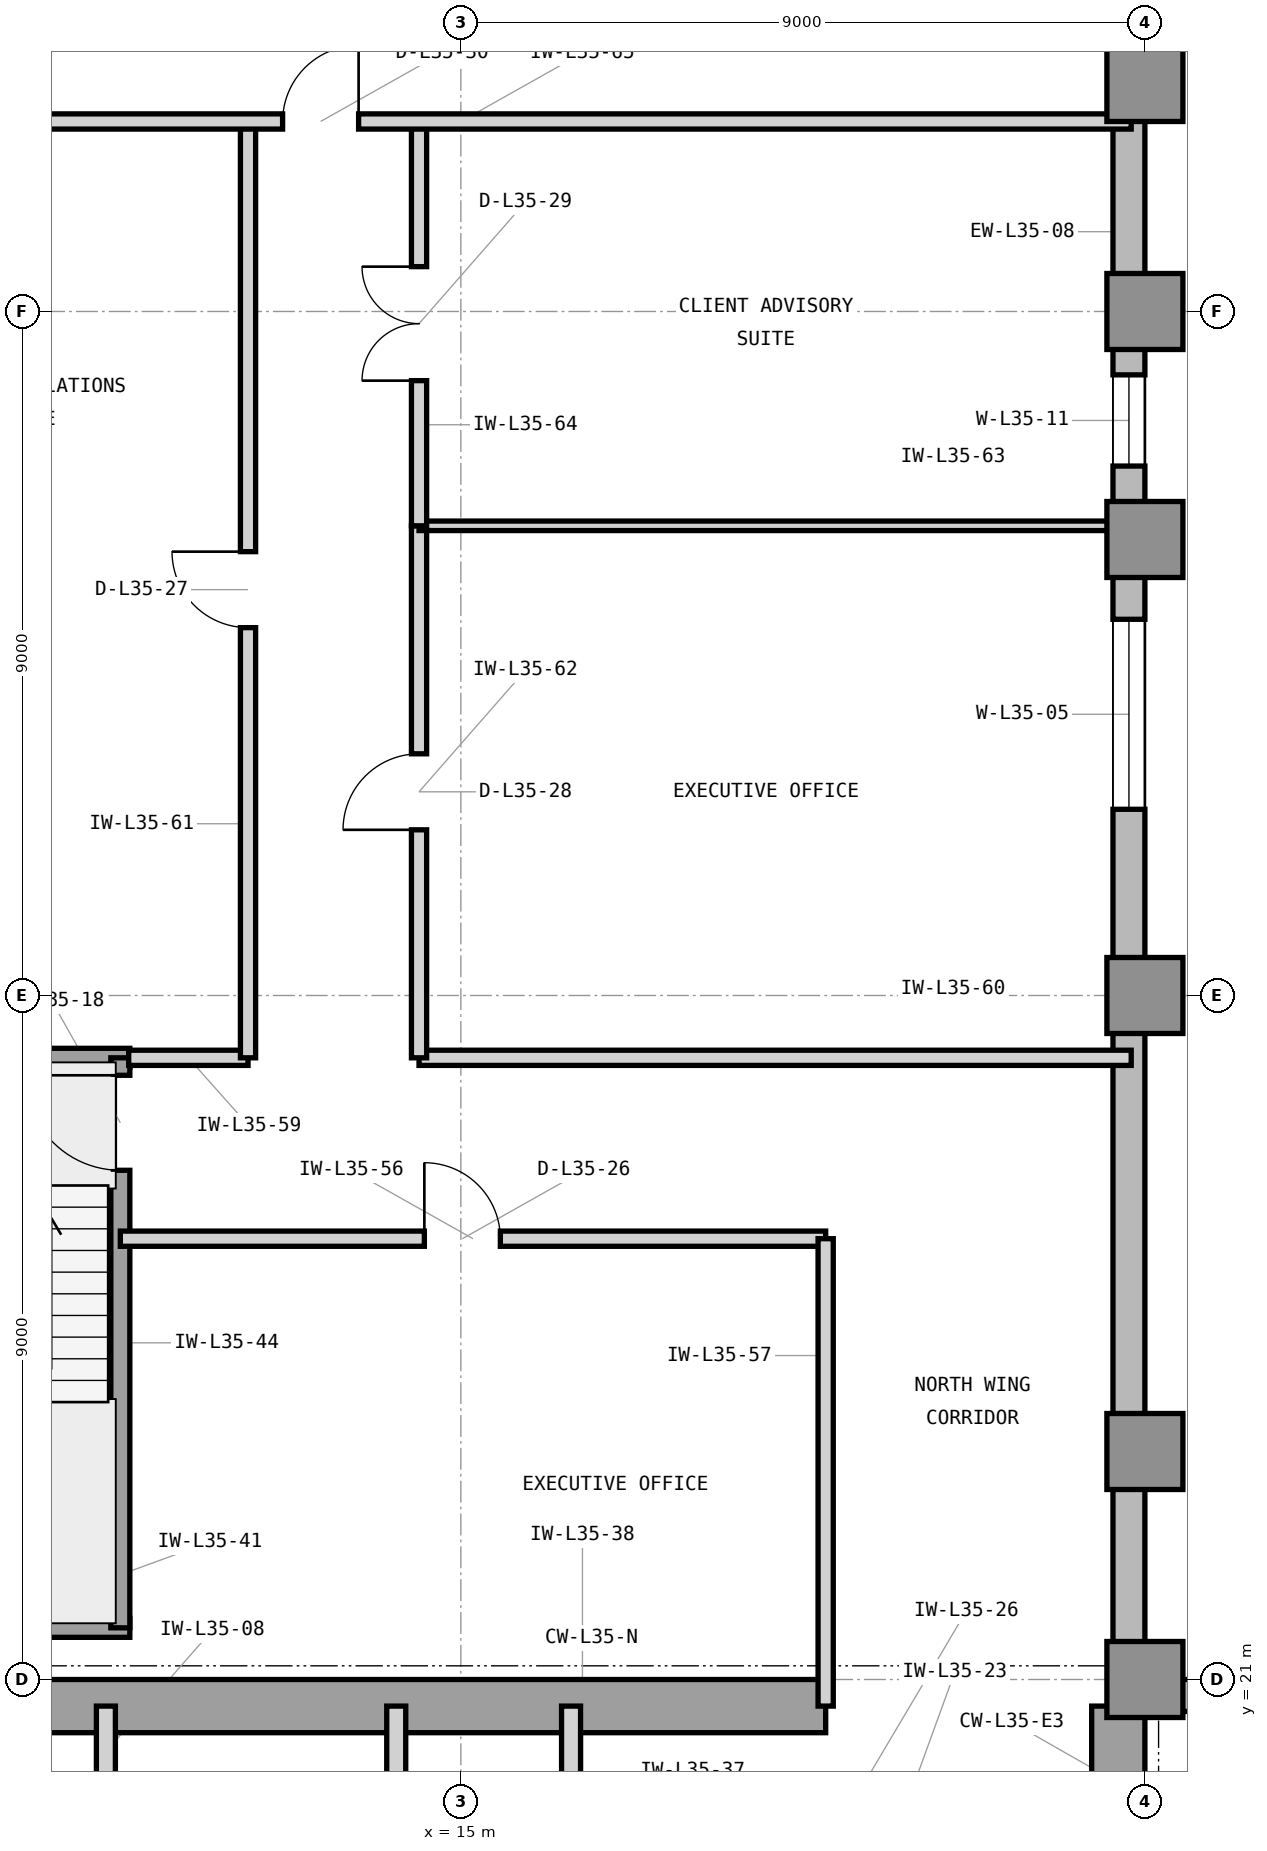
"""IFC4 building model, lengths in metres.
Left out: names, types, materials, properties, quantities, classifications, styles, units other than length and angle.
Written with IfcOpenShell. Run it as: python <this file> out.ifc"""

import sys

from ifc_helpers import new_model, si_unit, direction, frame, frame_2d, origin, origin_2d, place, context, subcontext, project, spatial, rectangle, extrude, element, fill, save


model = new_model("IFC4")
c1 = context("Model", 3, precision=1e-05, world=origin(), true_north=direction((0.0, 1.0)))
c2 = subcontext(c1, "Body", "Model", "MODEL_VIEW")
j1 = project(units=[si_unit("LENGTHUNIT", "METRE"), si_unit("PLANEANGLEUNIT", "RADIAN")], contexts=[c1])
p1 = place(None, origin())
s1 = spatial("IfcSite", under=j1, at=p1, CompositionType="ELEMENT")
p2 = place(p1, origin())
s2 = spatial("IfcBuilding", under=s1, at=p2, CompositionType="ELEMENT")
p3 = place(p2, frame((0.0, 0.0, 147.9)))
s3 = spatial("IfcBuildingStorey", under=s2, at=p3, CompositionType="ELEMENT", Elevation=147.9)
p4 = place(p3, frame((7.475, 20.65, 0.0), z_axis=(0.0, 0.0, 1.0), x_axis=(1.0, 0.0, 0.0)))
e1 = element("IfcWall", 1, at=p4, inside=s3, PredefinedType="SHEAR", context=c2, shape_type="SweptSolid", body=[
    extrude(rectangle(XDim=12.325, YDim=0.7, at=frame_2d((6.163, 0.0))), origin(), (0.0, 0.0, 1.0), 3.9),
])
p5 = place(p3, frame((23.65, 16.6, 0.0), z_axis=(0.0, 0.0, 1.0), x_axis=(0.0, 1.0, 0.0)))
e2 = element("IfcWall", 2, at=p5, inside=s3, PredefinedType="SHEAR", context=c2, shape_type="SweptSolid", body=[
    extrude(rectangle(XDim=4.05, YDim=0.7, at=frame_2d((2.025, 0.0))), origin(), (0.0, 0.0, 1.0), 3.9),
])
for number, where, z_axis, x_axis in (
    (3, (24.0, 21.0, 0.0), (0.0, 0.0, 1.0), (1.0, 0.0, 0.0)),
    (4, (24.0, 24.0, 0.0), (0.0, 0.0, 1.0), (1.0, 0.0, 0.0)),
    (5, (24.0, 30.0, 0.0), (0.0, 0.0, 1.0), (1.0, 0.0, 0.0)),
    (6, (24.0, 36.0, 0.0), (0.0, 0.0, 1.0), (1.0, 0.0, 0.0)),
    (7, (24.0, 39.0, 0.0), (0.0, 0.0, 1.0), (1.0, 0.0, 0.0)),
    (8, (24.0, 42.0, 0.0), (0.0, 0.0, 1.0), (1.0, 0.0, 0.0)),
):
    element("IfcColumn", number, at=place(p3, frame(where, z_axis=z_axis, x_axis=x_axis)), inside=s3, PredefinedType="COLUMN", context=c2, shape_type="SweptSolid", body=[
        extrude(rectangle(XDim=1.0, YDim=1.0, at=origin_2d()), origin(), (0.0, 0.0, 1.0), 3.9),
    ])
p6 = place(p3, frame((58.4, 20.79, 0.0), z_axis=(0.0, 0.0, 1.0), x_axis=(-1.0, 0.0, 0.0)))
e9 = element("IfcWall", 9, at=p6, inside=s3, PredefinedType="STANDARD", context=c2, shape_type="SweptSolid", body=[
    extrude(rectangle(XDim=34.4, YDim=0.42, at=frame_2d((17.2, 0.0))), origin(), (0.0, 0.0, 1.0), 3.7),
])
p7 = place(p6, frame((20.864, 0.0, 0.85)))
e10 = element("IfcOpeningElement", 10, at=p7, cuts=e9, PredefinedType="OPENING", context=c2, shape_type="SweptSolid", body=[
    extrude(rectangle(XDim=2.5, YDim=2.25, at=frame_2d((1.25, 1.125))), frame((0.0, 0.22, 0.0), z_axis=(0.0, -1.0, 0.0), x_axis=(1.0, 0.0, 0.0)), (0.0, 0.0, 1.0), 0.44),
])
p8 = place(p6, frame((32.222, 0.0, 0.85)))
e11 = element("IfcOpeningElement", 11, at=p8, cuts=e9, PredefinedType="OPENING", context=c2, shape_type="SweptSolid", body=[
    extrude(rectangle(XDim=1.2, YDim=2.25, at=frame_2d((0.6, 1.125))), frame((0.0, 0.22, 0.0), z_axis=(0.0, -1.0, 0.0), x_axis=(1.0, 0.0, 0.0)), (0.0, 0.0, 1.0), 0.44),
])
p9 = place(p6, frame((11.386, 0.0, 0.85)))
e12 = element("IfcOpeningElement", 12, at=p9, cuts=e9, PredefinedType="OPENING", context=c2, shape_type="SweptSolid", body=[
    extrude(rectangle(XDim=2.5, YDim=2.25, at=frame_2d((1.25, 1.125))), frame((0.0, 0.22, 0.0), z_axis=(0.0, -1.0, 0.0), x_axis=(1.0, 0.0, 0.0)), (0.0, 0.0, 1.0), 0.44),
])
p10 = place(p3, frame((23.79, 21.0, 0.0), z_axis=(0.0, 0.0, 1.0), x_axis=(0.0, 1.0, 0.0)))
e13 = element("IfcWall", 13, at=p10, inside=s3, PredefinedType="STANDARD", context=c2, shape_type="SweptSolid", body=[
    extrude(rectangle(XDim=25.4, YDim=0.42, at=frame_2d((12.7, 0.0))), origin(), (0.0, 0.0, 1.0), 3.7),
])
p11 = place(p10, frame((11.45, 0.0, 0.85)))
e14 = element("IfcOpeningElement", 14, at=p11, cuts=e13, PredefinedType="OPENING", context=c2, shape_type="SweptSolid", body=[
    extrude(rectangle(XDim=2.5, YDim=2.25, at=frame_2d((1.25, 1.125))), frame((0.0, 0.22, 0.0), z_axis=(0.0, -1.0, 0.0), x_axis=(1.0, 0.0, 0.0)), (0.0, 0.0, 1.0), 0.44),
])
p12 = place(p10, frame((15.966, 0.0, 0.85)))
e15 = element("IfcOpeningElement", 15, at=p12, cuts=e13, PredefinedType="OPENING", context=c2, shape_type="SweptSolid", body=[
    extrude(rectangle(XDim=1.2, YDim=2.25, at=frame_2d((0.6, 1.125))), frame((0.0, 0.22, 0.0), z_axis=(0.0, -1.0, 0.0), x_axis=(1.0, 0.0, 0.0)), (0.0, 0.0, 1.0), 0.44),
])
p13 = place(p3, frame((10.33, 19.45, 0.0), z_axis=(0.0, 0.0, 1.0), x_axis=(0.0, 1.0, 0.0)))
e16 = element("IfcWall", 16, at=p13, inside=s3, PredefinedType="PARTITIONING", context=c2, shape_type="SweptSolid", body=[
    extrude(rectangle(XDim=1.2, YDim=0.25, at=frame_2d((0.6, 0.0))), origin(), (0.0, 0.0, 1.0), 2.994),
])
for number, where, z_axis, x_axis in (
    (17, (14.15, 16.7, 0.0), (0.0, 0.0, 1.0), (0.0, 1.0, 0.0)),
    (18, (16.45, 16.7, 0.0), (0.0, 0.0, 1.0), (0.0, 1.0, 0.0)),
):
    element("IfcWall", number, at=place(p3, frame(where, z_axis=z_axis, x_axis=x_axis)), inside=s3, PredefinedType="PARTITIONING", context=c2, shape_type="SweptSolid", body=[
        extrude(rectangle(XDim=3.95, YDim=0.25, at=frame_2d((1.975, 0.0))), origin(), (0.0, 0.0, 1.0), 3.69),
    ])
for number, where, z_axis, x_axis in (
    (19, (6.555, 21.68, 0.0), (0.0, 0.0, 1.0), (1.0, 0.0, 0.0)),
    (20, (6.555, 29.18, 0.0), (0.0, 0.0, 1.0), (1.0, 0.0, 0.0)),
):
    element("IfcWall", number, at=place(p3, frame(where, z_axis=z_axis, x_axis=x_axis)), inside=s3, PredefinedType="SHEAR", context=c2, shape_type="SweptSolid", body=[
        extrude(rectangle(XDim=4.09, YDim=0.25, at=frame_2d((2.045, 0.0))), origin(), (0.0, 0.0, 1.0), 3.9),
    ])
p14 = place(p3, frame((10.52, 21.68, 0.0), z_axis=(0.0, 0.0, 1.0), x_axis=(0.0, 1.0, 0.0)))
e21 = element("IfcWall", 21, at=p14, inside=s3, PredefinedType="SHEAR", context=c2, shape_type="SweptSolid", body=[
    extrude(rectangle(XDim=7.5, YDim=0.25, at=frame_2d((3.75, 0.0))), origin(), (0.0, 0.0, 1.0), 3.9),
])
p15 = place(p14, frame((6.02, 0.0, 0.0)))
e22 = element("IfcOpeningElement", 22, at=p15, cuts=e21, PredefinedType="OPENING", context=c2, shape_type="SweptSolid", body=[
    extrude(rectangle(XDim=1.25, YDim=2.2, at=frame_2d((0.625, 1.1))), frame((0.0, 0.135, 0.0), z_axis=(0.0, -1.0, 0.0), x_axis=(1.0, 0.0, 0.0)), (0.0, 0.0, 1.0), 0.27),
])
p16 = place(p3, frame((10.52, 26.8, 0.0), z_axis=(0.0, 0.0, 1.0), x_axis=(1.0, 0.0, 0.0)))
e23 = element("IfcWall", 23, at=p16, inside=s3, PredefinedType="PARTITIONING", context=c2, shape_type="SweptSolid", body=[
    extrude(rectangle(XDim=9.28, YDim=0.2, at=frame_2d((4.64, 0.0))), origin(), (0.0, 0.0, 1.0), 3.69),
])
p17 = place(p16, frame((4.0, 0.0, 0.0)))
e24 = element("IfcOpeningElement", 24, at=p17, cuts=e23, PredefinedType="OPENING", context=c2, shape_type="SweptSolid", body=[
    extrude(rectangle(XDim=1.0, YDim=2.15, at=frame_2d((0.5, 1.075))), frame((0.0, 0.11, 0.0), z_axis=(0.0, -1.0, 0.0), x_axis=(1.0, 0.0, 0.0)), (0.0, 0.0, 1.0), 0.22),
])
p18 = place(p3, frame((19.8, 20.65, 0.0), z_axis=(0.0, 0.0, 1.0), x_axis=(0.0, 1.0, 0.0)))
e25 = element("IfcWall", 25, at=p18, inside=s3, PredefinedType="PARTITIONING", context=c2, shape_type="SweptSolid", body=[
    extrude(rectangle(XDim=6.15, YDim=0.2, at=frame_2d((3.075, 0.0))), origin(), (0.0, 0.0, 1.0), 3.69),
])
p19 = place(p3, frame((10.63, 29.18, 0.0), z_axis=(0.0, 0.0, 1.0), x_axis=(1.0, 0.0, 0.0)))
e26 = element("IfcWall", 26, at=p19, inside=s3, PredefinedType="PARTITIONING", context=c2, shape_type="SweptSolid", body=[
    extrude(rectangle(XDim=1.57, YDim=0.2, at=frame_2d((0.785, 0.0))), origin(), (0.0, 0.0, 1.0), 3.69),
])
p20 = place(p3, frame((14.45, 29.18, 0.0), z_axis=(0.0, 0.0, 1.0), x_axis=(1.0, 0.0, 0.0)))
e27 = element("IfcWall", 27, at=p20, inside=s3, PredefinedType="PARTITIONING", context=c2, shape_type="SweptSolid", body=[
    extrude(rectangle(XDim=9.37, YDim=0.2, at=frame_2d((4.685, 0.0))), origin(), (0.0, 0.0, 1.0), 3.69),
])
p21 = place(p3, frame((12.2, 29.18, 0.0), z_axis=(0.0, 0.0, 1.0), x_axis=(0.0, 1.0, 0.0)))
e28 = element("IfcWall", 28, at=p21, inside=s3, PredefinedType="PARTITIONING", context=c2, shape_type="SweptSolid", body=[
    extrude(rectangle(XDim=12.32, YDim=0.2, at=frame_2d((6.16, 0.0))), origin(), (0.0, 0.0, 1.0), 3.69),
])
p22 = place(p21, frame((5.66, 0.0, 0.0)))
e29 = element("IfcOpeningElement", 29, at=p22, cuts=e28, PredefinedType="OPENING", context=c2, shape_type="SweptSolid", body=[
    extrude(rectangle(XDim=1.0, YDim=2.15, at=frame_2d((0.5, 1.075))), frame((0.0, 0.11, 0.0), z_axis=(0.0, -1.0, 0.0), x_axis=(1.0, 0.0, 0.0)), (0.0, 0.0, 1.0), 0.22),
])
p23 = place(p3, frame((14.45, 29.18, 0.0), z_axis=(0.0, 0.0, 1.0), x_axis=(0.0, 1.0, 0.0)))
e30 = element("IfcWall", 30, at=p23, inside=s3, PredefinedType="PARTITIONING", context=c2, shape_type="SweptSolid", body=[
    extrude(rectangle(XDim=7.0, YDim=0.2, at=frame_2d((3.5, 0.0))), origin(), (0.0, 0.0, 1.0), 3.69),
])
p24 = place(p23, frame((3.0, 0.0, 0.0)))
e31 = element("IfcOpeningElement", 31, at=p24, cuts=e30, PredefinedType="OPENING", context=c2, shape_type="SweptSolid", body=[
    extrude(rectangle(XDim=1.0, YDim=2.15, at=frame_2d((0.5, 1.075))), frame((0.0, 0.11, 0.0), z_axis=(0.0, -1.0, 0.0), x_axis=(1.0, 0.0, 0.0)), (0.0, 0.0, 1.0), 0.22),
])
p25 = place(p3, frame((14.45, 36.18, 0.0), z_axis=(0.0, 0.0, 1.0), x_axis=(1.0, 0.0, 0.0)))
e32 = element("IfcWall", 32, at=p25, inside=s3, PredefinedType="PARTITIONING", context=c2, shape_type="SweptSolid", body=[
    extrude(rectangle(XDim=9.37, YDim=0.125, at=frame_2d((4.685, 0.0))), origin(), (0.0, 0.0, 1.0), 3.69),
])
p26 = place(p3, frame((14.45, 36.18, 0.0), z_axis=(0.0, 0.0, 1.0), x_axis=(0.0, 1.0, 0.0)))
e33 = element("IfcWall", 33, at=p26, inside=s3, PredefinedType="PARTITIONING", context=c2, shape_type="SweptSolid", body=[
    extrude(rectangle(XDim=5.32, YDim=0.2, at=frame_2d((2.66, 0.0))), origin(), (0.0, 0.0, 1.0), 3.69),
])
p27 = place(p26, frame((1.91, 0.0, 0.0)))
e34 = element("IfcOpeningElement", 34, at=p27, cuts=e33, PredefinedType="OPENING", context=c2, shape_type="SweptSolid", body=[
    extrude(rectangle(XDim=1.5, YDim=2.3, at=frame_2d((0.75, 1.15))), frame((0.0, 0.11, 0.0), z_axis=(0.0, -1.0, 0.0), x_axis=(1.0, 0.0, 0.0)), (0.0, 0.0, 1.0), 0.22),
])
p28 = place(p3, frame((6.18, 41.5, 0.0), z_axis=(0.0, 0.0, 1.0), x_axis=(1.0, 0.0, 0.0)))
e35 = element("IfcWall", 35, at=p28, inside=s3, PredefinedType="PARTITIONING", context=c2, shape_type="SweptSolid", body=[
    extrude(rectangle(XDim=17.64, YDim=0.2, at=frame_2d((8.82, 0.0))), origin(), (0.0, 0.0, 1.0), 3.69),
])
p29 = place(p28, frame((6.475, 0.0, 0.0)))
e36 = element("IfcOpeningElement", 36, at=p29, cuts=e35, PredefinedType="OPENING", context=c2, shape_type="SweptSolid", body=[
    extrude(rectangle(XDim=1.0, YDim=2.15, at=frame_2d((0.5, 1.075))), frame((0.0, 0.11, 0.0), z_axis=(0.0, -1.0, 0.0), x_axis=(1.0, 0.0, 0.0)), (0.0, 0.0, 1.0), 0.22),
])
p30 = place(p11, origin())
e37 = element("IfcWindow", 37, at=p30, inside=s3, PartitioningType="SINGLE_PANEL", PredefinedType="WINDOW", context=c2, shape_type="SweptSolid", body=[
    extrude(rectangle(XDim=2.5, YDim=2.25, at=frame_2d((1.25, 1.125))), frame((0.0, 0.11, 0.0), z_axis=(0.0, -1.0, 0.0), x_axis=(1.0, 0.0, 0.0)), (0.0, 0.0, 1.0), 0.06),
])
fill(e14, e37)
p31 = place(p15, origin())
e38 = element("IfcDoor", 38, at=p31, inside=s3, OperationType="SINGLE_SWING_RIGHT", PredefinedType="DOOR", context=c2, shape_type="SweptSolid", body=[
    extrude(rectangle(XDim=1.25, YDim=2.2, at=frame_2d((0.625, 1.1))), frame((0.0, 0.025, 0.0), z_axis=(0.0, -1.0, 0.0), x_axis=(1.0, 0.0, 0.0)), (0.0, 0.0, 1.0), 0.05),
])
fill(e22, e38)
p32 = place(p17, origin())
e39 = element("IfcDoor", 39, at=p32, inside=s3, OperationType="SINGLE_SWING_LEFT", PredefinedType="DOOR", context=c2, shape_type="SweptSolid", body=[
    extrude(rectangle(XDim=1.0, YDim=2.15, at=frame_2d((0.5, 1.075))), frame((0.0, 0.025, 0.0), z_axis=(0.0, -1.0, 0.0), x_axis=(1.0, 0.0, 0.0)), (0.0, 0.0, 1.0), 0.05),
])
fill(e24, e39)
p33 = place(p22, origin())
e40 = element("IfcDoor", 40, at=p33, inside=s3, OperationType="SINGLE_SWING_RIGHT", PredefinedType="DOOR", context=c2, shape_type="SweptSolid", body=[
    extrude(rectangle(XDim=1.0, YDim=2.15, at=frame_2d((0.5, 1.075))), frame((0.0, 0.025, 0.0), z_axis=(0.0, -1.0, 0.0), x_axis=(1.0, 0.0, 0.0)), (0.0, 0.0, 1.0), 0.05),
])
fill(e29, e40)
p34 = place(p24, origin())
e41 = element("IfcDoor", 41, at=p34, inside=s3, OperationType="SINGLE_SWING_LEFT", PredefinedType="DOOR", context=c2, shape_type="SweptSolid", body=[
    extrude(rectangle(XDim=1.0, YDim=2.15, at=frame_2d((0.5, 1.075))), frame((0.0, 0.025, 0.0), z_axis=(0.0, -1.0, 0.0), x_axis=(1.0, 0.0, 0.0)), (0.0, 0.0, 1.0), 0.05),
])
fill(e31, e41)
p35 = place(p27, origin())
e42 = element("IfcDoor", 42, at=p35, inside=s3, OperationType="DOUBLE_DOOR_SINGLE_SWING", PredefinedType="DOOR", context=c2, shape_type="SweptSolid", body=[
    extrude(rectangle(XDim=1.5, YDim=2.3, at=frame_2d((0.75, 1.15))), frame((0.0, 0.025, 0.0), z_axis=(0.0, -1.0, 0.0), x_axis=(1.0, 0.0, 0.0)), (0.0, 0.0, 1.0), 0.05),
])
fill(e34, e42)
p36 = place(p29, origin())
e43 = element("IfcDoor", 43, at=p36, inside=s3, OperationType="SINGLE_SWING_RIGHT", PredefinedType="DOOR", context=c2, shape_type="SweptSolid", body=[
    extrude(rectangle(XDim=1.0, YDim=2.15, at=frame_2d((0.5, 1.075))), frame((0.0, 0.025, 0.0), z_axis=(0.0, -1.0, 0.0), x_axis=(1.0, 0.0, 0.0)), (0.0, 0.0, 1.0), 0.05),
])
fill(e36, e43)
p37 = place(p12, origin())
e44 = element("IfcWindow", 44, at=p37, inside=s3, PartitioningType="SINGLE_PANEL", PredefinedType="WINDOW", context=c2, shape_type="SweptSolid", body=[
    extrude(rectangle(XDim=1.2, YDim=2.25, at=frame_2d((0.6, 1.125))), frame((0.0, 0.11, 0.0), z_axis=(0.0, -1.0, 0.0), x_axis=(1.0, 0.0, 0.0)), (0.0, 0.0, 1.0), 0.06),
])
fill(e15, e44)
save(model, sys.argv[1])
